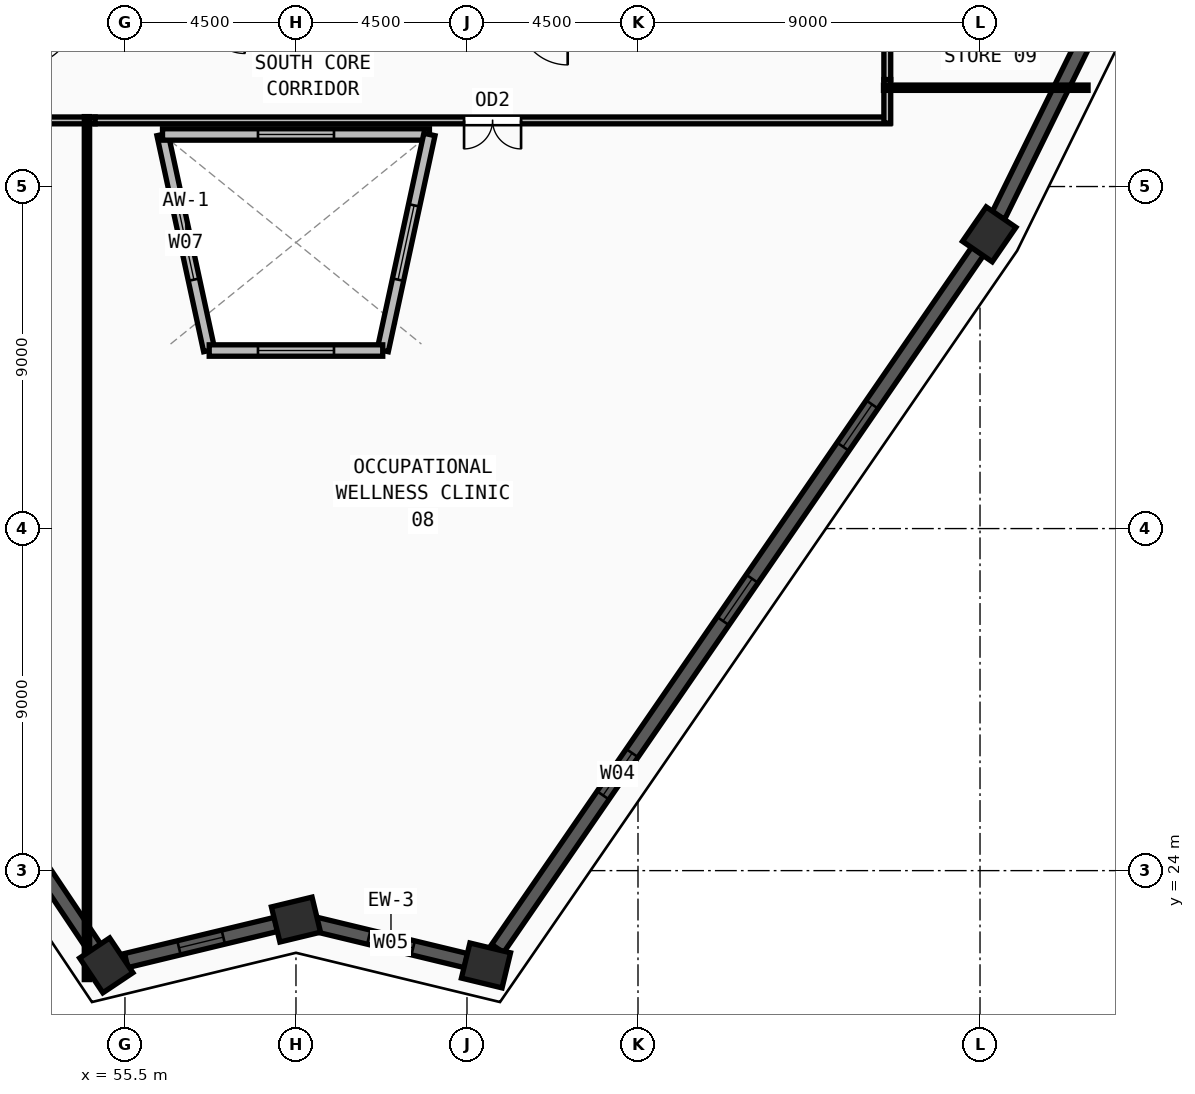
"""IFC4 building model, lengths in metres.
Left out: names, types, materials, properties, quantities, classifications, styles, units other than length and angle.
Written with IfcOpenShell. Run it as: python <this file> out.ifc"""

import sys

from ifc_helpers import new_model, si_unit, direction, frame, frame_2d, origin, origin_2d, place, context, subcontext, project, spatial, rectangle, extrude, source, transform, mapped, element, fill, save


model = new_model("IFC4")
c1 = context("Model", 3, precision=1e-05, world=origin(), true_north=direction((0.0, 1.0)))
c2 = subcontext(c1, "Body", "Model", "MODEL_VIEW")
j1 = project(units=[si_unit("LENGTHUNIT", "METRE"), si_unit("PLANEANGLEUNIT", "RADIAN")], contexts=[c1])
p1 = place(None, origin())
s1 = spatial("IfcSite", under=j1, at=p1, CompositionType="ELEMENT")
p2 = place(p1, origin())
s2 = spatial("IfcBuilding", under=s1, at=p2, CompositionType="ELEMENT")
p3 = place(p2, frame((0.0, 0.0, 286.5)))
s3 = spatial("IfcBuildingStorey", under=s2, at=p3, CompositionType="ELEMENT", Elevation=286.5)
m1 = source(origin(), c2, "Body", "SweptSolid", [
    extrude(rectangle(XDim=1.1, YDim=0.95, at=origin_2d()), origin(), (0.0, 0.0, 1.0), 3.75),
])
for number, where, z_axis, x_axis in (
    (1, (55.008, 21.507, 0.0), (0.0, 0.0, 1.0), (-0.556, 0.831, 0.0)),
    (2, (78.242, 40.742, 0.0), (0.0, 0.0, 1.0), (0.567, 0.824, 0.0)),
    (3, (65.0, 21.505, 0.0), (0.0, 0.0, 1.0), (-0.972, 0.235, 0.0)),
    (4, (60.0, 22.712, 0.0), (0.0, 0.0, 1.0), (0.972, 0.235, 0.0)),
):
    element("IfcColumn", number, at=place(p3, frame(where, z_axis=z_axis, x_axis=x_axis)), inside=s3, PredefinedType="COLUMN", context=c2, shape_type="MappedRepresentation", body=[
        mapped(m1, transform((0.0, 0.0, 0.0), x_axis=(1.0, 0.0, 0.0), y_axis=(0.0, 1.0, 0.0), z_axis=(0.0, 0.0, 1.0), scale=1.0)),
    ])
p4 = place(p3, frame((60.525, 22.585, 0.0), z_axis=(0.0, 0.0, 1.0), x_axis=(0.97211669423, -0.234497617897, 0.0)))
e5 = element("IfcWall", 5, at=p4, inside=s3, PredefinedType="SOLIDWALL", context=c2, shape_type="SweptSolid", body=[
    extrude(rectangle(XDim=4.063, YDim=0.38, at=frame_2d((2.032, 0.0))), origin(), (0.0, 0.0, 1.0), 3.57),
])
m2 = source(origin(), c2, "Body", "SweptSolid", [
    extrude(rectangle(XDim=1.2, YDim=1.9, at=frame_2d((0.6, 0.95))), frame((0.0, 0.2, 0.0), z_axis=(0.0, -1.0, 0.0), x_axis=(1.0, 0.0, 0.0)), (0.0, 0.0, 1.0), 0.4),
])
p5 = place(p4, frame((1.432, 0.0, 0.55)))
e6 = element("IfcOpeningElement", 6, at=p5, cuts=e5, PredefinedType="OPENING", context=c2, shape_type="MappedRepresentation", body=[
    mapped(m2, transform((0.0, 0.0, 0.0), x_axis=(1.0, 0.0, 0.0), y_axis=(0.0, 1.0, 0.0), z_axis=(0.0, 0.0, 1.0), scale=1.0)),
])
p6 = place(p3, frame((65.306, 21.95, 0.0), z_axis=(0.0, 0.0, 1.0), x_axis=(0.567030177534, 0.823697018184, 0.0)))
e7 = element("IfcWall", 7, at=p6, inside=s3, PredefinedType="SOLIDWALL", context=c2, shape_type="SweptSolid", body=[
    extrude(rectangle(XDim=22.274, YDim=0.38, at=frame_2d((11.137, 0.0))), origin(), (0.0, 0.0, 1.0), 3.57),
])
m3 = source(origin(), c2, "Body", "SweptSolid", [
    extrude(rectangle(XDim=1.35, YDim=1.85, at=frame_2d((0.675, 0.925))), frame((0.0, 0.2, 0.0), z_axis=(0.0, -1.0, 0.0), x_axis=(1.0, 0.0, 0.0)), (0.0, 0.0, 1.0), 0.4),
])
p7 = place(p6, frame((4.893, 0.0, 0.55)))
e8 = element("IfcOpeningElement", 8, at=p7, cuts=e7, PredefinedType="OPENING", context=c2, shape_type="MappedRepresentation", body=[
    mapped(m3, transform((0.0, 0.0, 0.0), x_axis=(1.0, 0.0, 0.0), y_axis=(0.0, 1.0, 0.0), z_axis=(0.0, 0.0, 1.0), scale=1.0)),
])
p8 = place(p6, frame((10.462, 0.0, 0.55)))
e9 = element("IfcOpeningElement", 9, at=p8, cuts=e7, PredefinedType="OPENING", context=c2, shape_type="MappedRepresentation", body=[
    mapped(m3, transform((0.0, 0.0, 0.0), x_axis=(1.0, 0.0, 0.0), y_axis=(0.0, 1.0, 0.0), z_axis=(0.0, 0.0, 1.0), scale=1.0)),
])
p9 = place(p6, frame((16.03, 0.0, 0.55)))
e10 = element("IfcOpeningElement", 10, at=p9, cuts=e7, PredefinedType="OPENING", context=c2, shape_type="MappedRepresentation", body=[
    mapped(m3, transform((0.0, 0.0, 0.0), x_axis=(1.0, 0.0, 0.0), y_axis=(0.0, 1.0, 0.0), z_axis=(0.0, 0.0, 1.0), scale=1.0)),
])
p10 = place(p3, frame((78.48, 41.226, 0.0), z_axis=(0.0, 0.0, 1.0), x_axis=(0.441646832519, 0.89718898529, 0.0)))
e11 = element("IfcWall", 11, at=p10, inside=s3, PredefinedType="SOLIDWALL", context=c2, shape_type="SweptSolid", body=[
    extrude(rectangle(XDim=26.988, YDim=0.38, at=frame_2d((13.494, 0.0))), origin(), (0.0, 0.0, 1.0), 3.57),
])
p11 = place(p10, frame((5.222, 0.0, 0.55)))
e12 = element("IfcOpeningElement", 12, at=p11, cuts=e11, PredefinedType="OPENING", context=c2, shape_type="MappedRepresentation", body=[
    mapped(m3, transform((0.0, 0.0, 0.0), x_axis=(1.0, 0.0, 0.0), y_axis=(0.0, 1.0, 0.0), z_axis=(0.0, 0.0, 1.0), scale=1.0)),
])
p12 = place(p10, frame((11.269, 0.0, 0.55)))
e13 = element("IfcOpeningElement", 13, at=p12, cuts=e11, PredefinedType="OPENING", context=c2, shape_type="MappedRepresentation", body=[
    mapped(m3, transform((0.0, 0.0, 0.0), x_axis=(1.0, 0.0, 0.0), y_axis=(0.0, 1.0, 0.0), z_axis=(0.0, 0.0, 1.0), scale=1.0)),
])
p13 = place(p10, frame((19.566, 0.0, 0.55)))
e14 = element("IfcOpeningElement", 14, at=p13, cuts=e11, PredefinedType="OPENING", context=c2, shape_type="MappedRepresentation", body=[
    mapped(m3, transform((0.0, 0.0, 0.0), x_axis=(1.0, 0.0, 0.0), y_axis=(0.0, 1.0, 0.0), z_axis=(0.0, 0.0, 1.0), scale=1.0)),
])
p14 = place(p3, frame((39.697, 44.382, 0.0), z_axis=(0.0, 0.0, 1.0), x_axis=(0.556246250685, -0.831017514014, 0.0)))
e15 = element("IfcWall", 15, at=p14, inside=s3, PredefinedType="SOLIDWALL", context=c2, shape_type="SweptSolid", body=[
    extrude(rectangle(XDim=26.986, YDim=0.38, at=frame_2d((13.493, 0.0))), origin(), (0.0, 0.0, 1.0), 3.57),
])
p15 = place(p14, frame((6.072, 0.0, 0.55)))
e16 = element("IfcOpeningElement", 16, at=p15, cuts=e15, PredefinedType="OPENING", context=c2, shape_type="MappedRepresentation", body=[
    mapped(m3, transform((0.0, 0.0, 0.0), x_axis=(1.0, 0.0, 0.0), y_axis=(0.0, 1.0, 0.0), z_axis=(0.0, 0.0, 1.0), scale=1.0)),
])
p16 = place(p14, frame((12.818, 0.0, 0.55)))
e17 = element("IfcOpeningElement", 17, at=p16, cuts=e15, PredefinedType="OPENING", context=c2, shape_type="MappedRepresentation", body=[
    mapped(m3, transform((0.0, 0.0, 0.0), x_axis=(1.0, 0.0, 0.0), y_axis=(0.0, 1.0, 0.0), z_axis=(0.0, 0.0, 1.0), scale=1.0)),
])
p17 = place(p14, frame((19.565, 0.0, 0.55)))
e18 = element("IfcOpeningElement", 18, at=p17, cuts=e15, PredefinedType="OPENING", context=c2, shape_type="MappedRepresentation", body=[
    mapped(m3, transform((0.0, 0.0, 0.0), x_axis=(1.0, 0.0, 0.0), y_axis=(0.0, 1.0, 0.0), z_axis=(0.0, 0.0, 1.0), scale=1.0)),
])
p18 = place(p3, frame((55.533, 21.634, 0.0), z_axis=(0.0, 0.0, 1.0), x_axis=(0.972117237932, 0.234495363953, 0.0)))
e19 = element("IfcWall", 19, at=p18, inside=s3, PredefinedType="SOLIDWALL", context=c2, shape_type="SweptSolid", body=[
    extrude(rectangle(XDim=4.055, YDim=0.38, at=frame_2d((2.028, 0.0))), origin(), (0.0, 0.0, 1.0), 3.57),
])
p19 = place(p18, frame((1.428, 0.0, 0.55)))
e20 = element("IfcOpeningElement", 20, at=p19, cuts=e19, PredefinedType="OPENING", context=c2, shape_type="MappedRepresentation", body=[
    mapped(m2, transform((0.0, 0.0, 0.0), x_axis=(1.0, 0.0, 0.0), y_axis=(0.0, 1.0, 0.0), z_axis=(0.0, 0.0, 1.0), scale=1.0)),
])
p20 = place(p3, frame((57.717, 37.685, 0.0), z_axis=(0.0, 0.0, 1.0), x_axis=(-0.211300278916, 0.977421194844, 0.0)))
e21 = element("IfcWall", 21, at=p20, inside=s3, PredefinedType="SOLIDWALL", context=c2, shape_type="SweptSolid", body=[
    extrude(rectangle(XDim=5.816, YDim=0.3, at=frame_2d((2.908, 0.0))), origin(), (0.0, 0.0, 1.0), 3.57),
])
m4 = source(origin(), c2, "Body", "SweptSolid", [
    extrude(rectangle(XDim=2.0, YDim=1.9, at=frame_2d((1.0, 0.95))), frame((0.0, 0.16, 0.0), z_axis=(0.0, -1.0, 0.0), x_axis=(1.0, 0.0, 0.0)), (0.0, 0.0, 1.0), 0.32),
])
p21 = place(p20, frame((1.908, 0.0, 0.55)))
e22 = element("IfcOpeningElement", 22, at=p21, cuts=e21, PredefinedType="OPENING", context=c2, shape_type="MappedRepresentation", body=[
    mapped(m4, transform((0.0, 0.0, 0.0), x_axis=(1.0, 0.0, 0.0), y_axis=(0.0, 1.0, 0.0), z_axis=(0.0, 0.0, 1.0), scale=1.0)),
])
p22 = place(p3, frame((56.488, 43.37, 0.0), z_axis=(0.0, 0.0, 1.0), x_axis=(1.0, 0.0, 0.0)))
e23 = element("IfcWall", 23, at=p22, inside=s3, PredefinedType="SOLIDWALL", context=c2, shape_type="SweptSolid", body=[
    extrude(rectangle(XDim=7.024, YDim=0.3, at=frame_2d((3.512, 0.0))), origin(), (0.0, 0.0, 1.0), 3.57),
])
p23 = place(p22, frame((2.512, 0.0, 0.55)))
e24 = element("IfcOpeningElement", 24, at=p23, cuts=e23, PredefinedType="OPENING", context=c2, shape_type="MappedRepresentation", body=[
    mapped(m4, transform((0.0, 0.0, 0.0), x_axis=(1.0, 0.0, 0.0), y_axis=(0.0, 1.0, 0.0), z_axis=(0.0, 0.0, 1.0), scale=1.0)),
])
p24 = place(p3, frame((63.512, 43.37, 0.0), z_axis=(0.0, 0.0, 1.0), x_axis=(-0.211300278916, -0.977421194844, 0.0)))
e25 = element("IfcWall", 25, at=p24, inside=s3, PredefinedType="SOLIDWALL", context=c2, shape_type="SweptSolid", body=[
    extrude(rectangle(XDim=5.816, YDim=0.3, at=frame_2d((2.908, 0.0))), origin(), (0.0, 0.0, 1.0), 3.57),
])
p25 = place(p24, frame((1.908, 0.0, 0.55)))
e26 = element("IfcOpeningElement", 26, at=p25, cuts=e25, PredefinedType="OPENING", context=c2, shape_type="MappedRepresentation", body=[
    mapped(m4, transform((0.0, 0.0, 0.0), x_axis=(1.0, 0.0, 0.0), y_axis=(0.0, 1.0, 0.0), z_axis=(0.0, 0.0, 1.0), scale=1.0)),
])
p26 = place(p3, frame((62.283, 37.685, 0.0), z_axis=(0.0, 0.0, 1.0), x_axis=(-1.0, 0.0, 0.0)))
e27 = element("IfcWall", 27, at=p26, inside=s3, PredefinedType="SOLIDWALL", context=c2, shape_type="SweptSolid", body=[
    extrude(rectangle(XDim=4.566, YDim=0.3, at=frame_2d((2.283, 0.0))), origin(), (0.0, 0.0, 1.0), 3.57),
])
p27 = place(p26, frame((1.283, 0.0, 0.55)))
e28 = element("IfcOpeningElement", 28, at=p27, cuts=e27, PredefinedType="OPENING", context=c2, shape_type="MappedRepresentation", body=[
    mapped(m4, transform((0.0, 0.0, 0.0), x_axis=(1.0, 0.0, 0.0), y_axis=(0.0, 1.0, 0.0), z_axis=(0.0, 0.0, 1.0), scale=1.0)),
])
p28 = place(p3, frame((54.715, 43.74, 0.0), z_axis=(0.0, 0.0, 1.0), x_axis=(-1.0, 0.0, 0.0)))
e29 = element("IfcWall", 29, at=p28, inside=s3, PredefinedType="PARTITIONING", context=c2, shape_type="SweptSolid", body=[
    extrude(rectangle(XDim=10.345, YDim=0.18, at=frame_2d((5.172, 0.0))), origin(), (0.0, 0.0, 1.0), 3.57),
])
m5 = source(origin(), c2, "Body", "SweptSolid", [
    extrude(rectangle(XDim=1.5, YDim=2.2, at=frame_2d((0.75, 1.1))), frame((0.0, 0.1, 0.0), z_axis=(0.0, -1.0, 0.0), x_axis=(1.0, 0.0, 0.0)), (0.0, 0.0, 1.0), 0.2),
])
p29 = place(p28, frame((4.423, 0.0, 0.0)))
e30 = element("IfcOpeningElement", 30, at=p29, cuts=e29, PredefinedType="OPENING", context=c2, shape_type="MappedRepresentation", body=[
    mapped(m5, transform((0.0, 0.0, 0.0), x_axis=(1.0, 0.0, 0.0), y_axis=(0.0, 1.0, 0.0), z_axis=(0.0, 0.0, 1.0), scale=1.0)),
])
p30 = place(p3, frame((75.63, 43.74, 0.0), z_axis=(0.0, 0.0, 1.0), x_axis=(-1.0, 0.0, 0.0)))
e31 = element("IfcWall", 31, at=p30, inside=s3, PredefinedType="PARTITIONING", context=c2, shape_type="SweptSolid", body=[
    extrude(rectangle(XDim=20.915, YDim=0.18, at=frame_2d((10.458, 0.0))), origin(), (0.0, 0.0, 1.0), 3.57),
])
p31 = place(p30, frame((9.707, 0.0, 0.0)))
e32 = element("IfcOpeningElement", 32, at=p31, cuts=e31, PredefinedType="OPENING", context=c2, shape_type="MappedRepresentation", body=[
    mapped(m5, transform((0.0, 0.0, 0.0), x_axis=(1.0, 0.0, 0.0), y_axis=(0.0, 1.0, 0.0), z_axis=(0.0, 0.0, 1.0), scale=1.0)),
])
p32 = place(p3, frame((75.56, 44.815, 0.0), z_axis=(0.0, 0.0, 1.0), x_axis=(0.0, -1.0, 0.0)))
e33 = element("IfcWall", 33, at=p32, inside=s3, PredefinedType="PARTITIONING", context=c2, shape_type="SweptSolid", body=[
    extrude(rectangle(XDim=1.145, YDim=0.18, at=frame_2d((0.573, 0.0))), origin(), (0.0, 0.0, 1.0), 3.57),
])
p33 = place(p3, frame((75.56, 48.21, 0.0), z_axis=(0.0, 0.0, 1.0), x_axis=(0.0, -1.0, 0.0)))
e34 = element("IfcWall", 34, at=p33, inside=s3, PredefinedType="PARTITIONING", context=c2, shape_type="SweptSolid", body=[
    extrude(rectangle(XDim=3.395, YDim=0.18, at=frame_2d((1.698, 0.0))), origin(), (0.0, 0.0, 1.0), 3.57),
])
p34 = place(p3, frame((75.46, 44.6, 0.0), z_axis=(0.0, 0.0, 1.0), x_axis=(1.0, 0.0, 0.0)))
e35 = element("IfcWall", 35, at=p34, inside=s3, PredefinedType="PARTITIONING", context=c2, shape_type="SweptSolid", body=[
    extrude(rectangle(XDim=5.383, YDim=0.14, at=frame_2d((2.691, 0.0))), origin(), (0.0, 0.0, 1.0), 3.57),
])
p35 = place(p3, frame((54.5, 43.84, 0.0), z_axis=(0.0, 0.0, 1.0), x_axis=(0.0, -1.0, 0.0)))
e36 = element("IfcWall", 36, at=p35, inside=s3, PredefinedType="PARTITIONING", context=c2, shape_type="SweptSolid", body=[
    extrude(rectangle(XDim=22.707, YDim=0.14, at=frame_2d((11.354, 0.0))), origin(), (0.0, 0.0, 1.0), 2.967),
])
m6 = source(origin(), c2, "Body", "SweptSolid", [
    extrude(rectangle(XDim=1.2, YDim=1.9, at=frame_2d((0.6, 0.95))), frame((0.0, 0.03, 0.0), z_axis=(0.0, -1.0, 0.0), x_axis=(1.0, 0.0, 0.0)), (0.0, 0.0, 1.0), 0.06),
])
p36 = place(p5, origin())
e37 = element("IfcWindow", 37, at=p36, inside=s3, PartitioningType="SINGLE_PANEL", PredefinedType="WINDOW", context=c2, shape_type="MappedRepresentation", body=[
    mapped(m6, transform((0.0, 0.0, 0.0), x_axis=(1.0, 0.0, 0.0), y_axis=(0.0, 1.0, 0.0), z_axis=(0.0, 0.0, 1.0), scale=1.0)),
])
fill(e6, e37)
m7 = source(origin(), c2, "Body", "SweptSolid", [
    extrude(rectangle(XDim=1.35, YDim=1.85, at=frame_2d((0.675, 0.925))), frame((0.0, 0.03, 0.0), z_axis=(0.0, -1.0, 0.0), x_axis=(1.0, 0.0, 0.0)), (0.0, 0.0, 1.0), 0.06),
])
p37 = place(p7, origin())
e38 = element("IfcWindow", 38, at=p37, inside=s3, PartitioningType="SINGLE_PANEL", PredefinedType="WINDOW", context=c2, shape_type="MappedRepresentation", body=[
    mapped(m7, transform((0.0, 0.0, 0.0), x_axis=(1.0, 0.0, 0.0), y_axis=(0.0, 1.0, 0.0), z_axis=(0.0, 0.0, 1.0), scale=1.0)),
])
fill(e8, e38)
p38 = place(p8, origin())
e39 = element("IfcWindow", 39, at=p38, inside=s3, PartitioningType="SINGLE_PANEL", PredefinedType="WINDOW", context=c2, shape_type="MappedRepresentation", body=[
    mapped(m7, transform((0.0, 0.0, 0.0), x_axis=(1.0, 0.0, 0.0), y_axis=(0.0, 1.0, 0.0), z_axis=(0.0, 0.0, 1.0), scale=1.0)),
])
fill(e9, e39)
p39 = place(p9, origin())
e40 = element("IfcWindow", 40, at=p39, inside=s3, PartitioningType="SINGLE_PANEL", PredefinedType="WINDOW", context=c2, shape_type="MappedRepresentation", body=[
    mapped(m7, transform((0.0, 0.0, 0.0), x_axis=(1.0, 0.0, 0.0), y_axis=(0.0, 1.0, 0.0), z_axis=(0.0, 0.0, 1.0), scale=1.0)),
])
fill(e10, e40)
p40 = place(p19, origin())
e41 = element("IfcWindow", 41, at=p40, inside=s3, PartitioningType="SINGLE_PANEL", PredefinedType="WINDOW", context=c2, shape_type="MappedRepresentation", body=[
    mapped(m6, transform((0.0, 0.0, 0.0), x_axis=(1.0, 0.0, 0.0), y_axis=(0.0, 1.0, 0.0), z_axis=(0.0, 0.0, 1.0), scale=1.0)),
])
fill(e20, e41)
m8 = source(origin(), c2, "Body", "SweptSolid", [
    extrude(rectangle(XDim=2.0, YDim=1.9, at=frame_2d((1.0, 0.95))), frame((0.0, 0.03, 0.0), z_axis=(0.0, -1.0, 0.0), x_axis=(1.0, 0.0, 0.0)), (0.0, 0.0, 1.0), 0.06),
])
p41 = place(p21, origin())
e42 = element("IfcWindow", 42, at=p41, inside=s3, PartitioningType="DOUBLE_PANEL_VERTICAL", PredefinedType="WINDOW", context=c2, shape_type="MappedRepresentation", body=[
    mapped(m8, transform((0.0, 0.0, 0.0), x_axis=(1.0, 0.0, 0.0), y_axis=(0.0, 1.0, 0.0), z_axis=(0.0, 0.0, 1.0), scale=1.0)),
])
fill(e22, e42)
p42 = place(p23, origin())
e43 = element("IfcWindow", 43, at=p42, inside=s3, PartitioningType="DOUBLE_PANEL_VERTICAL", PredefinedType="WINDOW", context=c2, shape_type="MappedRepresentation", body=[
    mapped(m8, transform((0.0, 0.0, 0.0), x_axis=(1.0, 0.0, 0.0), y_axis=(0.0, 1.0, 0.0), z_axis=(0.0, 0.0, 1.0), scale=1.0)),
])
fill(e24, e43)
p43 = place(p25, origin())
e44 = element("IfcWindow", 44, at=p43, inside=s3, PartitioningType="DOUBLE_PANEL_VERTICAL", PredefinedType="WINDOW", context=c2, shape_type="MappedRepresentation", body=[
    mapped(m8, transform((0.0, 0.0, 0.0), x_axis=(1.0, 0.0, 0.0), y_axis=(0.0, 1.0, 0.0), z_axis=(0.0, 0.0, 1.0), scale=1.0)),
])
fill(e26, e44)
p44 = place(p27, origin())
e45 = element("IfcWindow", 45, at=p44, inside=s3, PartitioningType="DOUBLE_PANEL_VERTICAL", PredefinedType="WINDOW", context=c2, shape_type="MappedRepresentation", body=[
    mapped(m8, transform((0.0, 0.0, 0.0), x_axis=(1.0, 0.0, 0.0), y_axis=(0.0, 1.0, 0.0), z_axis=(0.0, 0.0, 1.0), scale=1.0)),
])
fill(e28, e45)
m9 = source(origin(), c2, "Body", "SweptSolid", [
    extrude(rectangle(XDim=1.5, YDim=2.2, at=frame_2d((0.75, 1.1))), frame((0.0, 0.025, 0.0), z_axis=(0.0, -1.0, 0.0), x_axis=(1.0, 0.0, 0.0)), (0.0, 0.0, 1.0), 0.05),
])
p45 = place(p31, origin())
e46 = element("IfcDoor", 46, at=p45, inside=s3, OperationType="DOUBLE_DOOR_SINGLE_SWING", PredefinedType="DOOR", context=c2, shape_type="MappedRepresentation", body=[
    mapped(m9, transform((0.0, 0.0, 0.0), x_axis=(1.0, 0.0, 0.0), y_axis=(0.0, 1.0, 0.0), z_axis=(0.0, 0.0, 1.0), scale=1.0)),
])
fill(e32, e46)
save(model, sys.argv[1])
